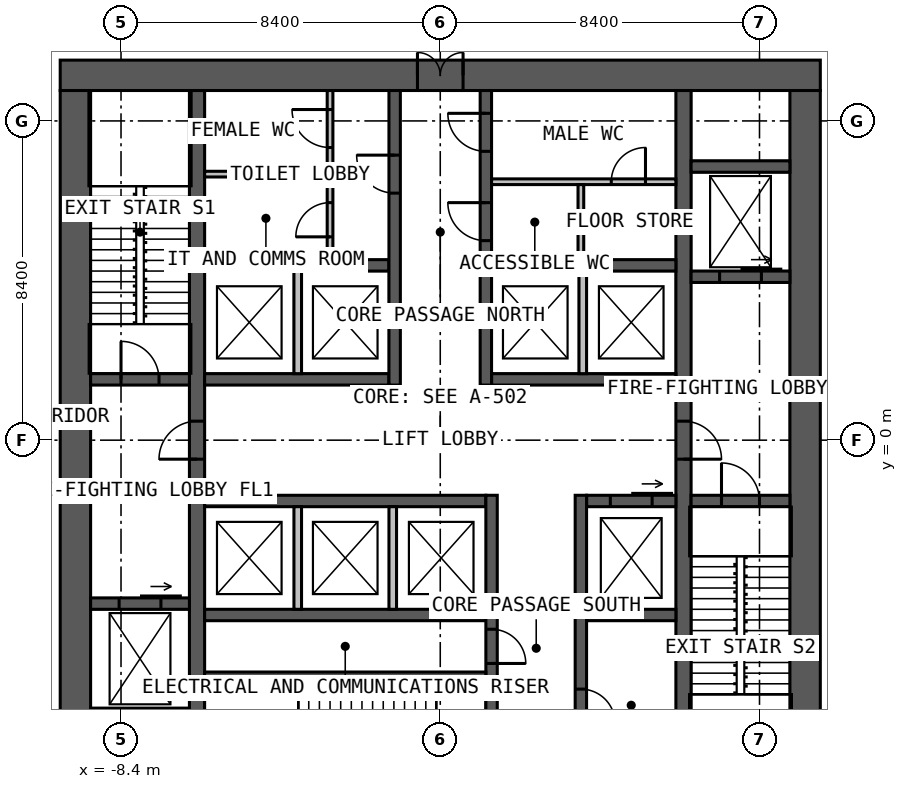
"""IFC4 building model, lengths in metres.
Left out: names, types, materials, properties, quantities, classifications, styles, units other than length and angle.
Written with IfcOpenShell. Run it as: python <this file> out.ifc"""

import sys

from ifc_helpers import new_model, si_unit, direction, frame, frame_2d, origin, place, context, subcontext, project, spatial, rectangle, extrude, element, fill, save


model = new_model("IFC4")
c1 = context("Model", 3, precision=1e-05, world=origin(), true_north=direction((0.0, 1.0)))
c2 = subcontext(c1, "Body", "Model", "MODEL_VIEW")
j1 = project(units=[si_unit("LENGTHUNIT", "METRE"), si_unit("PLANEANGLEUNIT", "RADIAN")], contexts=[c1])
p1 = place(None, origin())
s1 = spatial("IfcSite", under=j1, at=p1, CompositionType="ELEMENT")
p2 = place(p1, origin())
s2 = spatial("IfcBuilding", under=s1, at=p2, CompositionType="ELEMENT")
p3 = place(p2, frame((0.0, 0.0, 85.0)))
s3 = spatial("IfcBuildingStorey", under=s2, at=p3, CompositionType="ELEMENT", Elevation=85.0)
p4 = place(p3, frame((-10.0, 9.6, 0.0), z_axis=(0.0, 0.0, 1.0), x_axis=(1.0, 0.0, 0.0)))
e1 = element("IfcWall", 1, at=p4, inside=s3, PredefinedType="SOLIDWALL", context=c2, shape_type="SweptSolid", body=[
    extrude(rectangle(XDim=20.0, YDim=0.8, at=frame_2d((10.0, 0.0))), origin(), (0.0, 0.0, 1.0), 5.0),
])
p5 = place(p4, frame((9.4, 0.0, 0.0)))
e2 = element("IfcOpeningElement", 2, at=p5, cuts=e1, PredefinedType="OPENING", context=c2, shape_type="SweptSolid", body=[
    extrude(rectangle(XDim=1.2, YDim=2.2, at=frame_2d((0.6, 1.1))), frame((0.0, 0.41, 0.0), z_axis=(0.0, -1.0, 0.0), x_axis=(1.0, 0.0, 0.0)), (0.0, 0.0, 1.0), 0.82),
])
for number, where, z_axis, x_axis in (
    (3, (9.6, -9.2, 0.0), (0.0, 0.0, 1.0), (0.0, 1.0, 0.0)),
    (4, (-9.6, 9.2, 0.0), (0.0, 0.0, 1.0), (0.0, -1.0, 0.0)),
):
    element("IfcWall", number, at=place(p3, frame(where, z_axis=z_axis, x_axis=x_axis)), inside=s3, PredefinedType="SOLIDWALL", context=c2, shape_type="SweptSolid", body=[
        extrude(rectangle(XDim=18.4, YDim=0.8, at=frame_2d((9.2, 0.0))), origin(), (0.0, 0.0, 1.0), 5.0),
    ])
p6 = place(p3, frame((-6.4, -9.2, 0.0), z_axis=(0.0, 0.0, 1.0), x_axis=(0.0, 1.0, 0.0)))
e5 = element("IfcWall", 5, at=p6, inside=s3, PredefinedType="SOLIDWALL", context=c2, shape_type="SweptSolid", body=[
    extrude(rectangle(XDim=18.4, YDim=0.4, at=frame_2d((9.2, 0.0))), origin(), (0.0, 0.0, 1.0), 5.0),
])
p7 = place(p6, frame((8.7, 0.0, 0.0)))
e6 = element("IfcOpeningElement", 6, at=p7, cuts=e5, PredefinedType="OPENING", context=c2, shape_type="SweptSolid", body=[
    extrude(rectangle(XDim=1.0, YDim=2.2, at=frame_2d((0.5, 1.1))), frame((0.0, 0.21, 0.0), z_axis=(0.0, -1.0, 0.0), x_axis=(1.0, 0.0, 0.0)), (0.0, 0.0, 1.0), 0.42),
])
p8 = place(p3, frame((6.4, 9.2, 0.0), z_axis=(0.0, 0.0, 1.0), x_axis=(0.0, -1.0, 0.0)))
e7 = element("IfcWall", 7, at=p8, inside=s3, PredefinedType="SOLIDWALL", context=c2, shape_type="SweptSolid", body=[
    extrude(rectangle(XDim=18.4, YDim=0.4, at=frame_2d((9.2, 0.0))), origin(), (0.0, 0.0, 1.0), 5.0),
])
p9 = place(p8, frame((8.7, 0.0, 0.0)))
e8 = element("IfcOpeningElement", 8, at=p9, cuts=e7, PredefinedType="OPENING", context=c2, shape_type="SweptSolid", body=[
    extrude(rectangle(XDim=1.0, YDim=2.2, at=frame_2d((0.5, 1.1))), frame((0.0, 0.21, 0.0), z_axis=(0.0, -1.0, 0.0), x_axis=(1.0, 0.0, 0.0)), (0.0, 0.0, 1.0), 0.42),
])
for number, where, z_axis, x_axis in (
    (9, (-6.2, 1.6, 0.0), (0.0, 0.0, 1.0), (1.0, 0.0, 0.0)),
    (10, (1.35, 1.6, 0.0), (0.0, 0.0, 1.0), (1.0, 0.0, 0.0)),
    (11, (-6.2, 4.6, 0.0), (0.0, 0.0, 1.0), (1.0, 0.0, 0.0)),
    (12, (1.35, 4.6, 0.0), (0.0, 0.0, 1.0), (1.0, 0.0, 0.0)),
):
    element("IfcWall", number, at=place(p3, frame(where, z_axis=z_axis, x_axis=x_axis)), inside=s3, PredefinedType="SOLIDWALL", context=c2, shape_type="SweptSolid", body=[
        extrude(rectangle(XDim=4.85, YDim=0.3, at=frame_2d((2.425, 0.0))), origin(), (0.0, 0.0, 1.0), 5.0),
    ])
p10 = place(p3, frame((-1.2, 1.45, 0.0), z_axis=(0.0, 0.0, 1.0), x_axis=(0.0, 1.0, 0.0)))
e13 = element("IfcWall", 13, at=p10, inside=s3, PredefinedType="SOLIDWALL", context=c2, shape_type="SweptSolid", body=[
    extrude(rectangle(XDim=7.75, YDim=0.3, at=frame_2d((3.875, 0.0))), origin(), (0.0, 0.0, 1.0), 5.0),
])
p11 = place(p10, frame((5.05, 0.0, 0.0)))
e14 = element("IfcOpeningElement", 14, at=p11, cuts=e13, PredefinedType="OPENING", context=c2, shape_type="SweptSolid", body=[
    extrude(rectangle(XDim=1.0, YDim=2.2, at=frame_2d((0.5, 1.1))), frame((0.0, 0.16, 0.0), z_axis=(0.0, -1.0, 0.0), x_axis=(1.0, 0.0, 0.0)), (0.0, 0.0, 1.0), 0.32),
])
p12 = place(p3, frame((1.2, 1.45, 0.0), z_axis=(0.0, 0.0, 1.0), x_axis=(0.0, 1.0, 0.0)))
e15 = element("IfcWall", 15, at=p12, inside=s3, PredefinedType="SOLIDWALL", context=c2, shape_type="SweptSolid", body=[
    extrude(rectangle(XDim=7.75, YDim=0.3, at=frame_2d((3.875, 0.0))), origin(), (0.0, 0.0, 1.0), 5.0),
])
p13 = place(p12, frame((3.8, 0.0, 0.0)))
e16 = element("IfcOpeningElement", 16, at=p13, cuts=e15, PredefinedType="OPENING", context=c2, shape_type="SweptSolid", body=[
    extrude(rectangle(XDim=1.0, YDim=2.2, at=frame_2d((0.5, 1.1))), frame((0.0, 0.16, 0.0), z_axis=(0.0, -1.0, 0.0), x_axis=(1.0, 0.0, 0.0)), (0.0, 0.0, 1.0), 0.32),
])
p14 = place(p12, frame((6.15, 0.0, 0.0)))
e17 = element("IfcOpeningElement", 17, at=p14, cuts=e15, PredefinedType="OPENING", context=c2, shape_type="SweptSolid", body=[
    extrude(rectangle(XDim=1.0, YDim=2.2, at=frame_2d((0.5, 1.1))), frame((0.0, 0.16, 0.0), z_axis=(0.0, -1.0, 0.0), x_axis=(1.0, 0.0, 0.0)), (0.0, 0.0, 1.0), 0.32),
])
p15 = place(p3, frame((-6.2, -1.6, 0.0), z_axis=(0.0, 0.0, 1.0), x_axis=(1.0, 0.0, 0.0)))
e18 = element("IfcWall", 18, at=p15, inside=s3, PredefinedType="SOLIDWALL", context=c2, shape_type="SweptSolid", body=[
    extrude(rectangle(XDim=7.4, YDim=0.3, at=frame_2d((3.7, 0.0))), origin(), (0.0, 0.0, 1.0), 5.0),
])
p16 = place(p3, frame((3.85, -1.6, 0.0), z_axis=(0.0, 0.0, 1.0), x_axis=(1.0, 0.0, 0.0)))
e19 = element("IfcWall", 19, at=p16, inside=s3, PredefinedType="SOLIDWALL", context=c2, shape_type="SweptSolid", body=[
    extrude(rectangle(XDim=2.35, YDim=0.3, at=frame_2d((1.175, 0.0))), origin(), (0.0, 0.0, 1.0), 5.0),
])
p17 = place(p16, frame((0.625, 0.0, 0.0)))
e20 = element("IfcOpeningElement", 20, at=p17, cuts=e19, PredefinedType="OPENING", context=c2, shape_type="SweptSolid", body=[
    extrude(rectangle(XDim=1.1, YDim=2.2, at=frame_2d((0.55, 1.1))), frame((0.0, 0.16, 0.0), z_axis=(0.0, -1.0, 0.0), x_axis=(1.0, 0.0, 0.0)), (0.0, 0.0, 1.0), 0.32),
])
p18 = place(p3, frame((-6.2, -4.6, 0.0), z_axis=(0.0, 0.0, 1.0), x_axis=(1.0, 0.0, 0.0)))
e21 = element("IfcWall", 21, at=p18, inside=s3, PredefinedType="SOLIDWALL", context=c2, shape_type="SweptSolid", body=[
    extrude(rectangle(XDim=7.4, YDim=0.3, at=frame_2d((3.7, 0.0))), origin(), (0.0, 0.0, 1.0), 5.0),
])
p19 = place(p3, frame((3.85, -4.6, 0.0), z_axis=(0.0, 0.0, 1.0), x_axis=(1.0, 0.0, 0.0)))
e22 = element("IfcWall", 22, at=p19, inside=s3, PredefinedType="SOLIDWALL", context=c2, shape_type="SweptSolid", body=[
    extrude(rectangle(XDim=2.35, YDim=0.3, at=frame_2d((1.175, 0.0))), origin(), (0.0, 0.0, 1.0), 5.0),
])
p20 = place(p3, frame((1.35, -1.45, 0.0), z_axis=(0.0, 0.0, 1.0), x_axis=(0.0, -1.0, 0.0)))
e23 = element("IfcWall", 23, at=p20, inside=s3, PredefinedType="SOLIDWALL", context=c2, shape_type="SweptSolid", body=[
    extrude(rectangle(XDim=7.75, YDim=0.3, at=frame_2d((3.875, 0.0))), origin(), (0.0, 0.0, 1.0), 5.0),
])
p21 = place(p20, frame((5.8, 0.0, 0.0)))
e24 = element("IfcOpeningElement", 24, at=p21, cuts=e23, PredefinedType="OPENING", context=c2, shape_type="SweptSolid", body=[
    extrude(rectangle(XDim=1.0, YDim=2.2, at=frame_2d((0.5, 1.1))), frame((0.0, 0.16, 0.0), z_axis=(0.0, -1.0, 0.0), x_axis=(1.0, 0.0, 0.0)), (0.0, 0.0, 1.0), 0.32),
])
p22 = place(p20, frame((3.525, 0.0, 0.0)))
e25 = element("IfcOpeningElement", 25, at=p22, cuts=e23, PredefinedType="OPENING", context=c2, shape_type="SweptSolid", body=[
    extrude(rectangle(XDim=0.9, YDim=2.2, at=frame_2d((0.45, 1.1))), frame((0.0, 0.16, 0.0), z_axis=(0.0, -1.0, 0.0), x_axis=(1.0, 0.0, 0.0)), (0.0, 0.0, 1.0), 0.32),
])
p23 = place(p3, frame((3.7, -1.45, 0.0), z_axis=(0.0, 0.0, 1.0), x_axis=(0.0, -1.0, 0.0)))
e26 = element("IfcWall", 26, at=p23, inside=s3, PredefinedType="SOLIDWALL", context=c2, shape_type="SweptSolid", body=[
    extrude(rectangle(XDim=7.75, YDim=0.3, at=frame_2d((3.875, 0.0))), origin(), (0.0, 0.0, 1.0), 5.0),
])
p24 = place(p23, frame((5.1, 0.0, 0.0)))
e27 = element("IfcOpeningElement", 27, at=p24, cuts=e26, PredefinedType="OPENING", context=c2, shape_type="SweptSolid", body=[
    extrude(rectangle(XDim=0.9, YDim=2.2, at=frame_2d((0.45, 1.1))), frame((0.0, 0.16, 0.0), z_axis=(0.0, -1.0, 0.0), x_axis=(1.0, 0.0, 0.0)), (0.0, 0.0, 1.0), 0.32),
])
p25 = place(p3, frame((-6.2, -6.2, 0.0), z_axis=(0.0, 0.0, 1.0), x_axis=(1.0, 0.0, 0.0)))
e28 = element("IfcWall", 28, at=p25, inside=s3, PredefinedType="SOLIDWALL", context=c2, shape_type="SweptSolid", body=[
    extrude(rectangle(XDim=7.4, YDim=0.2, at=frame_2d((3.7, 0.0))), origin(), (0.0, 0.0, 1.0), 5.0),
])
p26 = place(p3, frame((-9.2, 1.6, 0.0), z_axis=(0.0, 0.0, 1.0), x_axis=(1.0, 0.0, 0.0)))
e29 = element("IfcWall", 29, at=p26, inside=s3, PredefinedType="SOLIDWALL", context=c2, shape_type="SweptSolid", body=[
    extrude(rectangle(XDim=2.6, YDim=0.3, at=frame_2d((1.3, 0.0))), origin(), (0.0, 0.0, 1.0), 5.0),
])
p27 = place(p26, frame((0.8, 0.0, 0.0)))
e30 = element("IfcOpeningElement", 30, at=p27, cuts=e29, PredefinedType="OPENING", context=c2, shape_type="SweptSolid", body=[
    extrude(rectangle(XDim=1.0, YDim=2.2, at=frame_2d((0.5, 1.1))), frame((0.0, 0.16, 0.0), z_axis=(0.0, -1.0, 0.0), x_axis=(1.0, 0.0, 0.0)), (0.0, 0.0, 1.0), 0.32),
])
p28 = place(p3, frame((6.6, -1.6, 0.0), z_axis=(0.0, 0.0, 1.0), x_axis=(1.0, 0.0, 0.0)))
e31 = element("IfcWall", 31, at=p28, inside=s3, PredefinedType="SOLIDWALL", context=c2, shape_type="SweptSolid", body=[
    extrude(rectangle(XDim=2.6, YDim=0.3, at=frame_2d((1.3, 0.0))), origin(), (0.0, 0.0, 1.0), 5.0),
])
p29 = place(p28, frame((0.8, 0.0, 0.0)))
e32 = element("IfcOpeningElement", 32, at=p29, cuts=e31, PredefinedType="OPENING", context=c2, shape_type="SweptSolid", body=[
    extrude(rectangle(XDim=1.0, YDim=2.2, at=frame_2d((0.5, 1.1))), frame((0.0, 0.16, 0.0), z_axis=(0.0, -1.0, 0.0), x_axis=(1.0, 0.0, 0.0)), (0.0, 0.0, 1.0), 0.32),
])
p30 = place(p3, frame((-9.2, -4.3, 0.0), z_axis=(0.0, 0.0, 1.0), x_axis=(1.0, 0.0, 0.0)))
e33 = element("IfcWall", 33, at=p30, inside=s3, PredefinedType="SOLIDWALL", context=c2, shape_type="SweptSolid", body=[
    extrude(rectangle(XDim=2.6, YDim=0.3, at=frame_2d((1.3, 0.0))), origin(), (0.0, 0.0, 1.0), 5.0),
])
p31 = place(p30, frame((0.75, 0.0, 0.0)))
e34 = element("IfcOpeningElement", 34, at=p31, cuts=e33, PredefinedType="OPENING", context=c2, shape_type="SweptSolid", body=[
    extrude(rectangle(XDim=1.1, YDim=2.2, at=frame_2d((0.55, 1.1))), frame((0.0, 0.16, 0.0), z_axis=(0.0, -1.0, 0.0), x_axis=(1.0, 0.0, 0.0)), (0.0, 0.0, 1.0), 0.32),
])
p32 = place(p3, frame((6.6, 4.3, 0.0), z_axis=(0.0, 0.0, 1.0), x_axis=(1.0, 0.0, 0.0)))
e35 = element("IfcWall", 35, at=p32, inside=s3, PredefinedType="SOLIDWALL", context=c2, shape_type="SweptSolid", body=[
    extrude(rectangle(XDim=2.6, YDim=0.3, at=frame_2d((1.3, 0.0))), origin(), (0.0, 0.0, 1.0), 5.0),
])
p33 = place(p32, frame((0.75, 0.0, 0.0)))
e36 = element("IfcOpeningElement", 36, at=p33, cuts=e35, PredefinedType="OPENING", context=c2, shape_type="SweptSolid", body=[
    extrude(rectangle(XDim=1.1, YDim=2.2, at=frame_2d((0.55, 1.1))), frame((0.0, 0.16, 0.0), z_axis=(0.0, -1.0, 0.0), x_axis=(1.0, 0.0, 0.0)), (0.0, 0.0, 1.0), 0.32),
])
for number, where, z_axis, x_axis in (
    (37, (-9.2, -7.2, 0.0), (0.0, 0.0, 1.0), (1.0, 0.0, 0.0)),
    (38, (6.6, 7.2, 0.0), (0.0, 0.0, 1.0), (1.0, 0.0, 0.0)),
):
    element("IfcWall", number, at=place(p3, frame(where, z_axis=z_axis, x_axis=x_axis)), inside=s3, PredefinedType="SOLIDWALL", context=c2, shape_type="SweptSolid", body=[
        extrude(rectangle(XDim=2.6, YDim=0.3, at=frame_2d((1.3, 0.0))), origin(), (0.0, 0.0, 1.0), 5.0),
    ])
for number, where, z_axis, x_axis in (
    (39, (-3.75, 1.75, 0.0), (0.0, 0.0, 1.0), (0.0, 1.0, 0.0)),
    (40, (3.75, 1.75, 0.0), (0.0, 0.0, 1.0), (0.0, 1.0, 0.0)),
    (41, (-3.75, -1.75, 0.0), (0.0, 0.0, 1.0), (0.0, -1.0, 0.0)),
    (42, (-1.25, -1.75, 0.0), (0.0, 0.0, 1.0), (0.0, -1.0, 0.0)),
):
    element("IfcWall", number, at=place(p3, frame(where, z_axis=z_axis, x_axis=x_axis)), inside=s3, PredefinedType="SOLIDWALL", context=c2, shape_type="SweptSolid", body=[
        extrude(rectangle(XDim=2.7, YDim=0.2, at=frame_2d((1.35, 0.0))), origin(), (0.0, 0.0, 1.0), 4.75),
    ])
p34 = place(p3, frame((1.35, 6.8, 0.0), z_axis=(0.0, 0.0, 1.0), x_axis=(1.0, 0.0, 0.0)))
e43 = element("IfcWall", 43, at=p34, inside=s3, PredefinedType="PARTITIONING", context=c2, shape_type="SweptSolid", body=[
    extrude(rectangle(XDim=4.85, YDim=0.15, at=frame_2d((2.425, 0.0))), origin(), (0.0, 0.0, 1.0), 4.75),
])
p35 = place(p34, frame((3.15, 0.0, 0.0)))
e44 = element("IfcOpeningElement", 44, at=p35, cuts=e43, PredefinedType="OPENING", context=c2, shape_type="SweptSolid", body=[
    extrude(rectangle(XDim=0.9, YDim=2.2, at=frame_2d((0.45, 1.1))), frame((0.0, 0.085, 0.0), z_axis=(0.0, -1.0, 0.0), x_axis=(1.0, 0.0, 0.0)), (0.0, 0.0, 1.0), 0.17),
])
p36 = place(p3, frame((3.7, 4.75, 0.0), z_axis=(0.0, 0.0, 1.0), x_axis=(0.0, 1.0, 0.0)))
e45 = element("IfcWall", 45, at=p36, inside=s3, PredefinedType="PARTITIONING", context=c2, shape_type="SweptSolid", body=[
    extrude(rectangle(XDim=1.975, YDim=0.15, at=frame_2d((0.988, 0.0))), origin(), (0.0, 0.0, 1.0), 4.75),
])
p37 = place(p3, frame((-2.9, 4.75, 0.0), z_axis=(0.0, 0.0, 1.0), x_axis=(0.0, 1.0, 0.0)))
e46 = element("IfcWall", 46, at=p37, inside=s3, PredefinedType="PARTITIONING", context=c2, shape_type="SweptSolid", body=[
    extrude(rectangle(XDim=4.45, YDim=0.15, at=frame_2d((2.225, 0.0))), origin(), (0.0, 0.0, 1.0), 4.75),
])
p38 = place(p37, frame((2.95, 0.0, 0.0)))
e47 = element("IfcOpeningElement", 47, at=p38, cuts=e46, PredefinedType="OPENING", context=c2, shape_type="SweptSolid", body=[
    extrude(rectangle(XDim=1.0, YDim=2.2, at=frame_2d((0.5, 1.1))), frame((0.0, 0.085, 0.0), z_axis=(0.0, -1.0, 0.0), x_axis=(1.0, 0.0, 0.0)), (0.0, 0.0, 1.0), 0.17),
])
p39 = place(p37, frame((0.6, 0.0, 0.0)))
e48 = element("IfcOpeningElement", 48, at=p39, cuts=e46, PredefinedType="OPENING", context=c2, shape_type="SweptSolid", body=[
    extrude(rectangle(XDim=0.9, YDim=2.2, at=frame_2d((0.45, 1.1))), frame((0.0, 0.085, 0.0), z_axis=(0.0, -1.0, 0.0), x_axis=(1.0, 0.0, 0.0)), (0.0, 0.0, 1.0), 0.17),
])
p40 = place(p3, frame((-6.2, 7.0, 0.0), z_axis=(0.0, 0.0, 1.0), x_axis=(1.0, 0.0, 0.0)))
e49 = element("IfcWall", 49, at=p40, inside=s3, PredefinedType="PARTITIONING", context=c2, shape_type="SweptSolid", body=[
    extrude(rectangle(XDim=3.225, YDim=0.15, at=frame_2d((1.612, 0.0))), origin(), (0.0, 0.0, 1.0), 4.75),
])
p41 = place(p5, origin())
e50 = element("IfcDoor", 50, at=p41, inside=s3, OperationType="DOUBLE_DOOR_SINGLE_SWING", PredefinedType="DOOR", context=c2, shape_type="SweptSolid", body=[
    extrude(rectangle(XDim=1.2, YDim=2.2, at=frame_2d((0.6, 1.1))), frame((0.0, 0.025, 0.0), z_axis=(0.0, -1.0, 0.0), x_axis=(1.0, 0.0, 0.0)), (0.0, 0.0, 1.0), 0.05),
])
fill(e2, e50)
p42 = place(p7, origin())
e51 = element("IfcDoor", 51, at=p42, inside=s3, OperationType="SINGLE_SWING_LEFT", PredefinedType="DOOR", context=c2, shape_type="SweptSolid", body=[
    extrude(rectangle(XDim=1.0, YDim=2.2, at=frame_2d((0.5, 1.1))), frame((0.0, 0.025, 0.0), z_axis=(0.0, -1.0, 0.0), x_axis=(1.0, 0.0, 0.0)), (0.0, 0.0, 1.0), 0.05),
])
fill(e6, e51)
p43 = place(p9, origin())
e52 = element("IfcDoor", 52, at=p43, inside=s3, OperationType="SINGLE_SWING_RIGHT", PredefinedType="DOOR", context=c2, shape_type="SweptSolid", body=[
    extrude(rectangle(XDim=1.0, YDim=2.2, at=frame_2d((0.5, 1.1))), frame((0.0, 0.025, 0.0), z_axis=(0.0, -1.0, 0.0), x_axis=(1.0, 0.0, 0.0)), (0.0, 0.0, 1.0), 0.05),
])
fill(e8, e52)
p44 = place(p27, origin())
e53 = element("IfcDoor", 53, at=p44, inside=s3, OperationType="SINGLE_SWING_LEFT", PredefinedType="DOOR", context=c2, shape_type="SweptSolid", body=[
    extrude(rectangle(XDim=1.0, YDim=2.2, at=frame_2d((0.5, 1.1))), frame((0.0, 0.025, 0.0), z_axis=(0.0, -1.0, 0.0), x_axis=(1.0, 0.0, 0.0)), (0.0, 0.0, 1.0), 0.05),
])
fill(e30, e53)
p45 = place(p29, origin())
e54 = element("IfcDoor", 54, at=p45, inside=s3, OperationType="SINGLE_SWING_LEFT", PredefinedType="DOOR", context=c2, shape_type="SweptSolid", body=[
    extrude(rectangle(XDim=1.0, YDim=2.2, at=frame_2d((0.5, 1.1))), frame((0.0, 0.025, 0.0), z_axis=(0.0, -1.0, 0.0), x_axis=(1.0, 0.0, 0.0)), (0.0, 0.0, 1.0), 0.05),
])
fill(e32, e54)
p46 = place(p11, origin())
e55 = element("IfcDoor", 55, at=p46, inside=s3, OperationType="SINGLE_SWING_RIGHT", PredefinedType="DOOR", context=c2, shape_type="SweptSolid", body=[
    extrude(rectangle(XDim=1.0, YDim=2.2, at=frame_2d((0.5, 1.1))), frame((0.0, 0.025, 0.0), z_axis=(0.0, -1.0, 0.0), x_axis=(1.0, 0.0, 0.0)), (0.0, 0.0, 1.0), 0.05),
])
fill(e14, e55)
p47 = place(p13, origin())
e56 = element("IfcDoor", 56, at=p47, inside=s3, OperationType="SINGLE_SWING_RIGHT", PredefinedType="DOOR", context=c2, shape_type="SweptSolid", body=[
    extrude(rectangle(XDim=1.0, YDim=2.2, at=frame_2d((0.5, 1.1))), frame((0.0, 0.025, 0.0), z_axis=(0.0, -1.0, 0.0), x_axis=(1.0, 0.0, 0.0)), (0.0, 0.0, 1.0), 0.05),
])
fill(e16, e56)
p48 = place(p14, origin())
e57 = element("IfcDoor", 57, at=p48, inside=s3, OperationType="SINGLE_SWING_RIGHT", PredefinedType="DOOR", context=c2, shape_type="SweptSolid", body=[
    extrude(rectangle(XDim=1.0, YDim=2.2, at=frame_2d((0.5, 1.1))), frame((0.0, 0.025, 0.0), z_axis=(0.0, -1.0, 0.0), x_axis=(1.0, 0.0, 0.0)), (0.0, 0.0, 1.0), 0.05),
])
fill(e17, e57)
p49 = place(p22, origin())
e58 = element("IfcDoor", 58, at=p49, inside=s3, OperationType="SINGLE_SWING_RIGHT", PredefinedType="DOOR", context=c2, shape_type="SweptSolid", body=[
    extrude(rectangle(XDim=0.9, YDim=2.2, at=frame_2d((0.45, 1.1))), frame((0.0, 0.025, 0.0), z_axis=(0.0, -1.0, 0.0), x_axis=(1.0, 0.0, 0.0)), (0.0, 0.0, 1.0), 0.05),
])
fill(e25, e58)
p50 = place(p24, origin())
e59 = element("IfcDoor", 59, at=p50, inside=s3, OperationType="SINGLE_SWING_RIGHT", PredefinedType="DOOR", context=c2, shape_type="SweptSolid", body=[
    extrude(rectangle(XDim=0.9, YDim=2.2, at=frame_2d((0.45, 1.1))), frame((0.0, 0.025, 0.0), z_axis=(0.0, -1.0, 0.0), x_axis=(1.0, 0.0, 0.0)), (0.0, 0.0, 1.0), 0.05),
])
fill(e27, e59)
p51 = place(p35, origin())
e60 = element("IfcDoor", 60, at=p51, inside=s3, OperationType="SINGLE_SWING_RIGHT", PredefinedType="DOOR", context=c2, shape_type="SweptSolid", body=[
    extrude(rectangle(XDim=0.9, YDim=2.2, at=frame_2d((0.45, 1.1))), frame((0.0, 0.025, 0.0), z_axis=(0.0, -1.0, 0.0), x_axis=(1.0, 0.0, 0.0)), (0.0, 0.0, 1.0), 0.05),
])
fill(e44, e60)
p52 = place(p38, origin())
e61 = element("IfcDoor", 61, at=p52, inside=s3, OperationType="SINGLE_SWING_RIGHT", PredefinedType="DOOR", context=c2, shape_type="SweptSolid", body=[
    extrude(rectangle(XDim=1.0, YDim=2.2, at=frame_2d((0.5, 1.1))), frame((0.0, 0.025, 0.0), z_axis=(0.0, -1.0, 0.0), x_axis=(1.0, 0.0, 0.0)), (0.0, 0.0, 1.0), 0.05),
])
fill(e47, e61)
p53 = place(p39, origin())
e62 = element("IfcDoor", 62, at=p53, inside=s3, OperationType="SINGLE_SWING_LEFT", PredefinedType="DOOR", context=c2, shape_type="SweptSolid", body=[
    extrude(rectangle(XDim=0.9, YDim=2.2, at=frame_2d((0.45, 1.1))), frame((0.0, 0.025, 0.0), z_axis=(0.0, -1.0, 0.0), x_axis=(1.0, 0.0, 0.0)), (0.0, 0.0, 1.0), 0.05),
])
fill(e48, e62)
p54 = place(p17, origin())
e63 = element("IfcDoor", 63, at=p54, inside=s3, OperationType="SLIDING_TO_LEFT", PredefinedType="DOOR", context=c2, shape_type="SweptSolid", body=[
    extrude(rectangle(XDim=1.1, YDim=2.2, at=frame_2d((0.55, 1.1))), frame((0.0, 0.025, 0.0), z_axis=(0.0, -1.0, 0.0), x_axis=(1.0, 0.0, 0.0)), (0.0, 0.0, 1.0), 0.05),
])
fill(e20, e63)
p55 = place(p31, origin())
e64 = element("IfcDoor", 64, at=p55, inside=s3, OperationType="SLIDING_TO_LEFT", PredefinedType="DOOR", context=c2, shape_type="SweptSolid", body=[
    extrude(rectangle(XDim=1.1, YDim=2.2, at=frame_2d((0.55, 1.1))), frame((0.0, 0.025, 0.0), z_axis=(0.0, -1.0, 0.0), x_axis=(1.0, 0.0, 0.0)), (0.0, 0.0, 1.0), 0.05),
])
fill(e34, e64)
p56 = place(p33, origin())
e65 = element("IfcDoor", 65, at=p56, inside=s3, OperationType="SLIDING_TO_LEFT", PredefinedType="DOOR", context=c2, shape_type="SweptSolid", body=[
    extrude(rectangle(XDim=1.1, YDim=2.2, at=frame_2d((0.55, 1.1))), frame((0.0, 0.025, 0.0), z_axis=(0.0, -1.0, 0.0), x_axis=(1.0, 0.0, 0.0)), (0.0, 0.0, 1.0), 0.05),
])
fill(e36, e65)
save(model, sys.argv[1])
